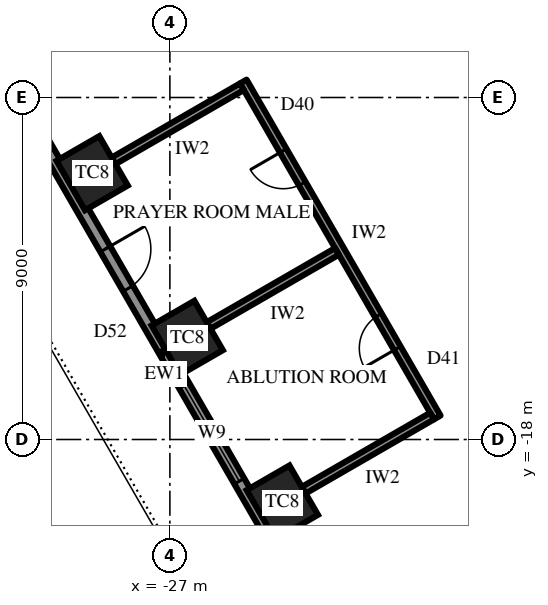
"""IFC4 building model, lengths in metres.
Left out: names, types, materials, properties, quantities, classifications, styles, units other than length and angle.
Written with IfcOpenShell. Run it as: python <this file> out.ifc"""

import sys

from ifc_helpers import new_model, si_unit, direction, frame, frame_2d, origin, origin_2d, place, context, subcontext, project, spatial, rectangle, extrude, element, fill, save


model = new_model("IFC4")
c1 = context("Model", 3, precision=1e-05, world=origin(), true_north=direction((0.0, 1.0)))
c2 = subcontext(c1, "Body", "Model", "MODEL_VIEW")
j1 = project(units=[si_unit("LENGTHUNIT", "METRE"), si_unit("PLANEANGLEUNIT", "RADIAN")], contexts=[c1])
p1 = place(None, origin())
s1 = spatial("IfcSite", under=j1, at=p1, CompositionType="ELEMENT")
p2 = place(p1, origin())
s2 = spatial("IfcBuilding", under=s1, at=p2, CompositionType="ELEMENT")
p3 = place(p2, frame((0.0, 0.0, 190.9)))
s3 = spatial("IfcBuildingStorey", under=s2, at=p3, CompositionType="ELEMENT", Elevation=190.9)
for number, where, z_axis, x_axis in (
    (1, (-29.045, -10.992, 0.0), (0.0, 0.0, 1.0), (0.5, -0.866, 0.0)),
    (2, (-26.544, -15.325, 0.0), (0.0, 0.0, 1.0), (0.5, -0.866, 0.0)),
    (3, (-24.042, -19.658, 0.0), (0.0, 0.0, 1.0), (0.5, -0.866, 0.0)),
):
    element("IfcColumn", number, at=place(p3, frame(where, z_axis=z_axis, x_axis=x_axis)), inside=s3, PredefinedType="COLUMN", context=c2, shape_type="SweptSolid", body=[
        extrude(rectangle(XDim=1.5, YDim=1.3, at=origin_2d()), origin(), (0.0, 0.0, 1.0), 4.2),
    ])
p4 = place(p3, frame((-34.656, -2.675, 0.0), z_axis=(0.0, 0.0, 1.0), x_axis=(0.500003084452, -0.866023622968, 0.0)))
e4 = element("IfcWall", 4, at=p4, inside=s3, PredefinedType="SOLIDWALL", context=c2, shape_type="SweptSolid", body=[
    extrude(rectangle(XDim=30.022, YDim=0.3, at=frame_2d((15.011, 0.0))), origin(), (0.0, 0.0, 1.0), 2.75),
])
p5 = place(p4, frame((1.052, 0.0, 0.6)))
e5 = element("IfcOpeningElement", 5, at=p5, cuts=e4, PredefinedType="OPENING", context=c2, shape_type="SweptSolid", body=[
    extrude(rectangle(XDim=2.9, YDim=1.9, at=frame_2d((1.45, 0.95))), frame((0.0, 0.16, 0.0), z_axis=(0.0, -1.0, 0.0), x_axis=(1.0, 0.0, 0.0)), (0.0, 0.0, 1.0), 0.32),
])
p6 = place(p4, frame((6.056, 0.0, 0.6)))
e6 = element("IfcOpeningElement", 6, at=p6, cuts=e4, PredefinedType="OPENING", context=c2, shape_type="SweptSolid", body=[
    extrude(rectangle(XDim=2.9, YDim=1.9, at=frame_2d((1.45, 0.95))), frame((0.0, 0.16, 0.0), z_axis=(0.0, -1.0, 0.0), x_axis=(1.0, 0.0, 0.0)), (0.0, 0.0, 1.0), 0.32),
])
p7 = place(p4, frame((11.909, 0.0, 0.0)))
e7 = element("IfcOpeningElement", 7, at=p7, cuts=e4, PredefinedType="OPENING", context=c2, shape_type="SweptSolid", body=[
    extrude(rectangle(XDim=1.2, YDim=2.4, at=frame_2d((0.6, 1.2))), frame((0.0, 0.16, 0.0), z_axis=(0.0, -1.0, 0.0), x_axis=(1.0, 0.0, 0.0)), (0.0, 0.0, 1.0), 0.32),
])
p8 = place(p4, frame((16.063, 0.0, 0.6)))
e8 = element("IfcOpeningElement", 8, at=p8, cuts=e4, PredefinedType="OPENING", context=c2, shape_type="SweptSolid", body=[
    extrude(rectangle(XDim=2.9, YDim=1.9, at=frame_2d((1.45, 0.95))), frame((0.0, 0.16, 0.0), z_axis=(0.0, -1.0, 0.0), x_axis=(1.0, 0.0, 0.0)), (0.0, 0.0, 1.0), 0.32),
])
p9 = place(p4, frame((21.067, 0.0, 0.6)))
e9 = element("IfcOpeningElement", 9, at=p9, cuts=e4, PredefinedType="OPENING", context=c2, shape_type="SweptSolid", body=[
    extrude(rectangle(XDim=2.9, YDim=1.9, at=frame_2d((1.45, 0.95))), frame((0.0, 0.16, 0.0), z_axis=(0.0, -1.0, 0.0), x_axis=(1.0, 0.0, 0.0)), (0.0, 0.0, 1.0), 0.32),
])
p10 = place(p4, frame((26.07, 0.0, 0.6)))
e10 = element("IfcOpeningElement", 10, at=p10, cuts=e4, PredefinedType="OPENING", context=c2, shape_type="SweptSolid", body=[
    extrude(rectangle(XDim=2.9, YDim=1.9, at=frame_2d((1.45, 0.95))), frame((0.0, 0.16, 0.0), z_axis=(0.0, -1.0, 0.0), x_axis=(1.0, 0.0, 0.0)), (0.0, 0.0, 1.0), 0.32),
])
p11 = place(p3, frame((-25.069, -8.58, 0.0), z_axis=(0.0, 0.0, 1.0), x_axis=(0.500005407604, -0.86602228168, 0.0)))
e11 = element("IfcWall", 11, at=p11, inside=s3, PredefinedType="PARTITIONING", context=c2, shape_type="SweptSolid", body=[
    extrude(rectangle(XDim=10.208, YDim=0.2, at=frame_2d((5.104, 0.0))), origin(), (0.0, 0.0, 1.0), 4.0),
])
p12 = place(p11, frame((2.102, 0.0, 0.0)))
e12 = element("IfcOpeningElement", 12, at=p12, cuts=e11, PredefinedType="OPENING", context=c2, shape_type="SweptSolid", body=[
    extrude(rectangle(XDim=1.0, YDim=2.2, at=frame_2d((0.5, 1.1))), frame((0.0, 0.11, 0.0), z_axis=(0.0, -1.0, 0.0), x_axis=(1.0, 0.0, 0.0)), (0.0, 0.0, 1.0), 0.22),
])
p13 = place(p11, frame((7.105, 0.0, 0.0)))
e13 = element("IfcOpeningElement", 13, at=p13, cuts=e11, PredefinedType="OPENING", context=c2, shape_type="SweptSolid", body=[
    extrude(rectangle(XDim=1.0, YDim=2.2, at=frame_2d((0.5, 1.1))), frame((0.0, 0.11, 0.0), z_axis=(0.0, -1.0, 0.0), x_axis=(1.0, 0.0, 0.0)), (0.0, 0.0, 1.0), 0.22),
])
p14 = place(p3, frame((-25.105, -8.717, 0.0), z_axis=(0.0, 0.0, 1.0), x_axis=(-0.866000020948, -0.500043961785, 0.0)))
e14 = element("IfcWall", 14, at=p14, inside=s3, PredefinedType="PARTITIONING", context=c2, shape_type="SweptSolid", body=[
    extrude(rectangle(XDim=3.9, YDim=0.2, at=frame_2d((1.95, 0.0))), origin(), (0.0, 0.0, 1.0), 3.082),
])
p15 = place(p3, frame((-22.603, -13.05, 0.0), z_axis=(0.0, 0.0, 1.0), x_axis=(-0.866027128446, -0.499997012787, 0.0)))
e15 = element("IfcWall", 15, at=p15, inside=s3, PredefinedType="PARTITIONING", context=c2, shape_type="SweptSolid", body=[
    extrude(rectangle(XDim=3.9, YDim=0.2, at=frame_2d((1.95, 0.0))), origin(), (0.0, 0.0, 1.0), 4.0),
])
p16 = place(p3, frame((-20.101, -17.383, 0.0), z_axis=(0.0, 0.0, 1.0), x_axis=(-0.866042777325, -0.499969906938, 0.0)))
e16 = element("IfcWall", 16, at=p16, inside=s3, PredefinedType="PARTITIONING", context=c2, shape_type="SweptSolid", body=[
    extrude(rectangle(XDim=3.9, YDim=0.2, at=frame_2d((1.95, 0.0))), origin(), (0.0, 0.0, 1.0), 3.082),
])
p17 = place(p7, origin())
e17 = element("IfcDoor", 17, at=p17, inside=s3, OperationType="SINGLE_SWING_RIGHT", PredefinedType="DOOR", context=c2, shape_type="SweptSolid", body=[
    extrude(rectangle(XDim=1.2, YDim=2.4, at=frame_2d((0.6, 1.2))), frame((0.0, 0.025, 0.0), z_axis=(0.0, -1.0, 0.0), x_axis=(1.0, 0.0, 0.0)), (0.0, 0.0, 1.0), 0.05),
])
fill(e7, e17)
p18 = place(p8, origin())
e18 = element("IfcWindow", 18, at=p18, inside=s3, PartitioningType="SINGLE_PANEL", PredefinedType="WINDOW", context=c2, shape_type="SweptSolid", body=[
    extrude(rectangle(XDim=2.9, YDim=1.9, at=frame_2d((1.45, 0.95))), frame((0.0, 0.03, 0.0), z_axis=(0.0, -1.0, 0.0), x_axis=(1.0, 0.0, 0.0)), (0.0, 0.0, 1.0), 0.06),
])
fill(e8, e18)
p19 = place(p12, frame((1.0, 0.0, 0.0), z_axis=(0.0, 0.0, 1.0), x_axis=(-1.0, 0.0, 0.0)))
e19 = element("IfcDoor", 19, at=p19, inside=s3, OperationType="SINGLE_SWING_LEFT", PredefinedType="DOOR", context=c2, shape_type="SweptSolid", body=[
    extrude(rectangle(XDim=1.0, YDim=2.2, at=frame_2d((0.5, 1.1))), frame((0.0, 0.025, 0.0), z_axis=(0.0, -1.0, 0.0), x_axis=(1.0, 0.0, 0.0)), (0.0, 0.0, 1.0), 0.05),
])
fill(e12, e19)
p20 = place(p13, frame((1.0, 0.0, 0.0), z_axis=(0.0, 0.0, 1.0), x_axis=(-1.0, 0.0, 0.0)))
e20 = element("IfcDoor", 20, at=p20, inside=s3, OperationType="SINGLE_SWING_RIGHT", PredefinedType="DOOR", context=c2, shape_type="SweptSolid", body=[
    extrude(rectangle(XDim=1.0, YDim=2.2, at=frame_2d((0.5, 1.1))), frame((0.0, 0.025, 0.0), z_axis=(0.0, -1.0, 0.0), x_axis=(1.0, 0.0, 0.0)), (0.0, 0.0, 1.0), 0.05),
])
fill(e13, e20)
save(model, sys.argv[1])
